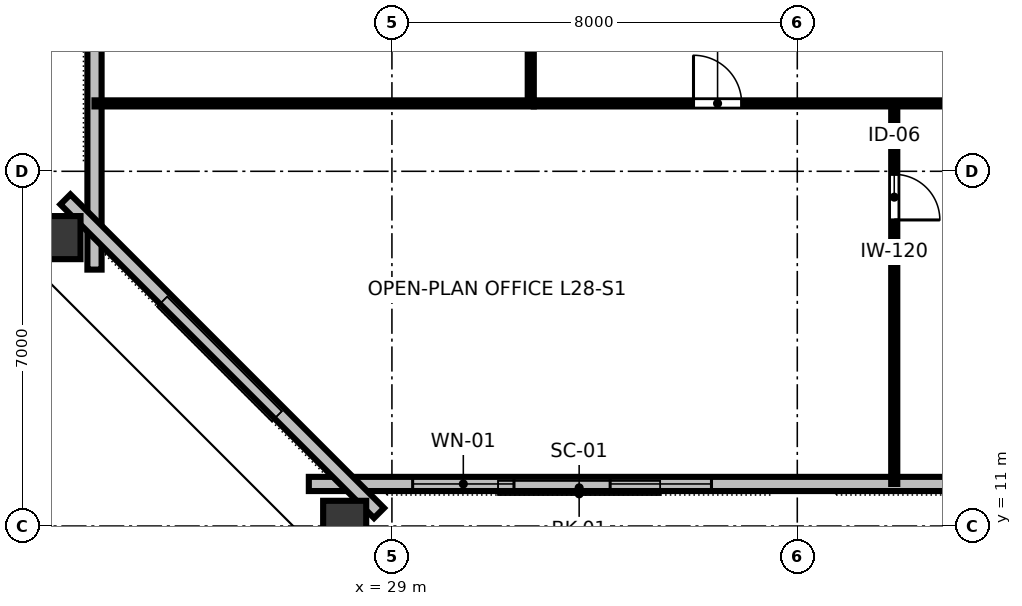
"""IFC4 building model, lengths in metres.
Left out: names, types, materials, properties, quantities, classifications, styles, units other than length and angle.
Written with IfcOpenShell. Run it as: python <this file> out.ifc"""

import sys

from ifc_helpers import new_model, si_unit, direction, frame, frame_2d, origin, origin_2d, place, context, subcontext, project, spatial, rectangle, hollow_rectangle, extrude, element, fill, save


model = new_model("IFC4")
c1 = context("Model", 3, precision=1e-05, world=origin(), true_north=direction((0.0, 1.0)))
c2 = subcontext(c1, "Body", "Model", "MODEL_VIEW")
j1 = project(units=[si_unit("LENGTHUNIT", "METRE"), si_unit("PLANEANGLEUNIT", "RADIAN")], contexts=[c1])
p1 = place(None, origin())
s1 = spatial("IfcSite", under=j1, at=p1, CompositionType="ELEMENT")
p2 = place(p1, origin())
s2 = spatial("IfcBuilding", under=s1, at=p2, CompositionType="ELEMENT")
p3 = place(p2, frame((0.0, 0.0, 109.6)))
s3 = spatial("IfcBuildingStorey", under=s2, at=p3, CompositionType="ELEMENT", Elevation=109.6)
for number, where, z_axis, x_axis in (
    (1, (28.067, 10.998, 0.0), (0.0, 0.0, 1.0), (1.0, 0.0, 0.0)),
    (2, (22.354, 16.691, 0.0), (0.0, 0.0, 1.0), (0.0, 1.0, 0.0)),
):
    element("IfcColumn", number, at=place(p3, frame(where, z_axis=z_axis, x_axis=x_axis)), inside=s3, PredefinedType="COLUMN", context=c2, shape_type="SweptSolid", body=[
        extrude(hollow_rectangle(XDim=0.85, YDim=1.0, WallThickness=0.05, at=origin_2d()), origin(), (0.0, 0.0, 1.0), 3.358),
    ])
p4 = place(p3, frame((27.36, 11.83, 0.0), z_axis=(0.0, 0.0, 1.0), x_axis=(1.0, 0.0, 0.0)))
e3 = element("IfcWall", 3, at=p4, inside=s3, PredefinedType="STANDARD", context=c2, shape_type="SweptSolid", body=[
    extrude(rectangle(XDim=37.28, YDim=0.28, at=frame_2d((18.64, 0.0))), origin(), (0.0, 0.0, 1.0), 3.36),
])
p5 = place(p4, frame((19.99, 0.0, 0.0)))
e4 = element("IfcOpeningElement", 4, at=p5, cuts=e3, PredefinedType="OPENING", context=c2, shape_type="SweptSolid", body=[
    extrude(rectangle(XDim=1.4, YDim=2.15, at=frame_2d((0.7, 1.075))), frame((0.0, 0.15, 0.0), z_axis=(0.0, -1.0, 0.0), x_axis=(1.0, 0.0, 0.0)), (0.0, 0.0, 1.0), 0.3),
])
p6 = place(p4, frame((2.049, 0.0, 0.8)))
e5 = element("IfcOpeningElement", 5, at=p6, cuts=e3, PredefinedType="OPENING", context=c2, shape_type="SweptSolid", body=[
    extrude(rectangle(XDim=2.0, YDim=1.95, at=frame_2d((1.0, 0.975))), frame((0.0, 0.15, 0.0), z_axis=(0.0, -1.0, 0.0), x_axis=(1.0, 0.0, 0.0)), (0.0, 0.0, 1.0), 0.3),
])
p7 = place(p4, frame((5.947, 0.0, 0.8)))
e6 = element("IfcOpeningElement", 6, at=p7, cuts=e3, PredefinedType="OPENING", context=c2, shape_type="SweptSolid", body=[
    extrude(rectangle(XDim=2.0, YDim=1.95, at=frame_2d((1.0, 0.975))), frame((0.0, 0.15, 0.0), z_axis=(0.0, -1.0, 0.0), x_axis=(1.0, 0.0, 0.0)), (0.0, 0.0, 1.0), 0.3),
])
p8 = place(p4, frame((13.742, 0.0, 0.8)))
e7 = element("IfcOpeningElement", 7, at=p8, cuts=e3, PredefinedType="OPENING", context=c2, shape_type="SweptSolid", body=[
    extrude(rectangle(XDim=2.0, YDim=1.95, at=frame_2d((1.0, 0.975))), frame((0.0, 0.15, 0.0), z_axis=(0.0, -1.0, 0.0), x_axis=(1.0, 0.0, 0.0)), (0.0, 0.0, 1.0), 0.3),
])
p9 = place(p4, frame((25.436, 0.0, 0.8)))
e8 = element("IfcOpeningElement", 8, at=p9, cuts=e3, PredefinedType="OPENING", context=c2, shape_type="SweptSolid", body=[
    extrude(rectangle(XDim=2.0, YDim=1.95, at=frame_2d((1.0, 0.975))), frame((0.0, 0.15, 0.0), z_axis=(0.0, -1.0, 0.0), x_axis=(1.0, 0.0, 0.0)), (0.0, 0.0, 1.0), 0.3),
])
p10 = place(p4, frame((29.333, 0.0, 0.8)))
e9 = element("IfcOpeningElement", 9, at=p10, cuts=e3, PredefinedType="OPENING", context=c2, shape_type="SweptSolid", body=[
    extrude(rectangle(XDim=2.0, YDim=1.95, at=frame_2d((1.0, 0.975))), frame((0.0, 0.15, 0.0), z_axis=(0.0, -1.0, 0.0), x_axis=(1.0, 0.0, 0.0)), (0.0, 0.0, 1.0), 0.3),
])
p11 = place(p4, frame((33.231, 0.0, 0.8)))
e10 = element("IfcOpeningElement", 10, at=p11, cuts=e3, PredefinedType="OPENING", context=c2, shape_type="SweptSolid", body=[
    extrude(rectangle(XDim=2.0, YDim=1.95, at=frame_2d((1.0, 0.975))), frame((0.0, 0.15, 0.0), z_axis=(0.0, -1.0, 0.0), x_axis=(1.0, 0.0, 0.0)), (0.0, 0.0, 1.0), 0.3),
])
p12 = place(p3, frame((23.13, 47.94, 0.0), z_axis=(0.0, 0.0, 1.0), x_axis=(0.0, -1.0, 0.0)))
e11 = element("IfcWall", 11, at=p12, inside=s3, PredefinedType="STANDARD", context=c2, shape_type="SweptSolid", body=[
    extrude(rectangle(XDim=31.88, YDim=0.28, at=frame_2d((15.94, 0.0))), origin(), (0.0, 0.0, 1.0), 3.36),
])
p13 = place(p12, frame((5.665, 0.0, 0.8)))
e12 = element("IfcOpeningElement", 12, at=p13, cuts=e11, PredefinedType="OPENING", context=c2, shape_type="SweptSolid", body=[
    extrude(rectangle(XDim=2.0, YDim=1.95, at=frame_2d((1.0, 0.975))), frame((0.0, 0.15, 0.0), z_axis=(0.0, -1.0, 0.0), x_axis=(1.0, 0.0, 0.0)), (0.0, 0.0, 1.0), 0.3),
])
p14 = place(p12, frame((9.375, 0.0, 0.8)))
e13 = element("IfcOpeningElement", 13, at=p14, cuts=e11, PredefinedType="OPENING", context=c2, shape_type="SweptSolid", body=[
    extrude(rectangle(XDim=2.0, YDim=1.95, at=frame_2d((1.0, 0.975))), frame((0.0, 0.15, 0.0), z_axis=(0.0, -1.0, 0.0), x_axis=(1.0, 0.0, 0.0)), (0.0, 0.0, 1.0), 0.3),
])
p15 = place(p12, frame((20.505, 0.0, 0.8)))
e14 = element("IfcOpeningElement", 14, at=p15, cuts=e11, PredefinedType="OPENING", context=c2, shape_type="SweptSolid", body=[
    extrude(rectangle(XDim=2.0, YDim=1.95, at=frame_2d((1.0, 0.975))), frame((0.0, 0.15, 0.0), z_axis=(0.0, -1.0, 0.0), x_axis=(1.0, 0.0, 0.0)), (0.0, 0.0, 1.0), 0.3),
])
p16 = place(p12, frame((24.215, 0.0, 0.8)))
e15 = element("IfcOpeningElement", 15, at=p16, cuts=e11, PredefinedType="OPENING", context=c2, shape_type="SweptSolid", body=[
    extrude(rectangle(XDim=2.0, YDim=1.95, at=frame_2d((1.0, 0.975))), frame((0.0, 0.15, 0.0), z_axis=(0.0, -1.0, 0.0), x_axis=(1.0, 0.0, 0.0)), (0.0, 0.0, 1.0), 0.3),
])
p17 = place(p3, frame((22.556, 17.446, 0.0), z_axis=(0.0, 0.0, 1.0), x_axis=(0.707106781187, -0.707106781187, 0.0)))
e16 = element("IfcWall", 16, at=p17, inside=s3, PredefinedType="STANDARD", context=c2, shape_type="SweptSolid", body=[
    extrude(rectangle(XDim=8.753, YDim=0.28, at=frame_2d((4.376, 0.0))), origin(), (0.0, 0.0, 1.0), 3.36),
])
p18 = place(p3, frame((38.914, 19.34, 0.0), z_axis=(0.0, 0.0, 1.0), x_axis=(0.0, -1.0, 0.0)))
e17 = element("IfcWall", 17, at=p18, inside=s3, PredefinedType="PARTITIONING", context=c2, shape_type="SweptSolid", body=[
    extrude(rectangle(XDim=7.51, YDim=0.12, at=frame_2d((3.755, 0.0))), origin(), (0.0, 0.0, 1.0), 2.64),
])
p19 = place(p18, frame((1.4, 0.0, 0.0)))
e18 = element("IfcOpeningElement", 18, at=p19, cuts=e17, PredefinedType="OPENING", context=c2, shape_type="SweptSolid", body=[
    extrude(rectangle(XDim=0.9, YDim=2.15, at=frame_2d((0.45, 1.075))), frame((0.0, 0.07, 0.0), z_axis=(0.0, -1.0, 0.0), x_axis=(1.0, 0.0, 0.0)), (0.0, 0.0, 1.0), 0.14),
])
p20 = place(p3, frame((31.8, 19.34, 0.0), z_axis=(0.0, 0.0, 1.0), x_axis=(1.0, 0.0, 0.0)))
e19 = element("IfcWall", 19, at=p20, inside=s3, PredefinedType="PARTITIONING", context=c2, shape_type="SweptSolid", body=[
    extrude(rectangle(XDim=28.4, YDim=0.12, at=frame_2d((14.2, 0.0))), origin(), (0.0, 0.0, 1.0), 2.64),
])
p21 = place(p20, frame((3.152, 0.0, 0.0)))
e20 = element("IfcOpeningElement", 20, at=p21, cuts=e19, PredefinedType="OPENING", context=c2, shape_type="SweptSolid", body=[
    extrude(rectangle(XDim=0.95, YDim=2.15, at=frame_2d((0.475, 1.075))), frame((0.0, 0.07, 0.0), z_axis=(0.0, -1.0, 0.0), x_axis=(1.0, 0.0, 0.0)), (0.0, 0.0, 1.0), 0.14),
])
p22 = place(p20, frame((10.136, 0.0, 0.0)))
e21 = element("IfcOpeningElement", 21, at=p22, cuts=e19, PredefinedType="OPENING", context=c2, shape_type="SweptSolid", body=[
    extrude(rectangle(XDim=0.95, YDim=2.15, at=frame_2d((0.475, 1.075))), frame((0.0, 0.07, 0.0), z_axis=(0.0, -1.0, 0.0), x_axis=(1.0, 0.0, 0.0)), (0.0, 0.0, 1.0), 0.14),
])
p23 = place(p20, frame((15.813, 0.0, 0.0)))
e22 = element("IfcOpeningElement", 22, at=p23, cuts=e19, PredefinedType="OPENING", context=c2, shape_type="SweptSolid", body=[
    extrude(rectangle(XDim=0.95, YDim=2.15, at=frame_2d((0.475, 1.075))), frame((0.0, 0.07, 0.0), z_axis=(0.0, -1.0, 0.0), x_axis=(1.0, 0.0, 0.0)), (0.0, 0.0, 1.0), 0.14),
])
p24 = place(p20, frame((22.888, 0.0, 0.0)))
e23 = element("IfcOpeningElement", 23, at=p24, cuts=e19, PredefinedType="OPENING", context=c2, shape_type="SweptSolid", body=[
    extrude(rectangle(XDim=0.95, YDim=2.15, at=frame_2d((0.475, 1.075))), frame((0.0, 0.07, 0.0), z_axis=(0.0, -1.0, 0.0), x_axis=(1.0, 0.0, 0.0)), (0.0, 0.0, 1.0), 0.14),
])
p25 = place(p3, frame((31.74, 19.4, 0.0), z_axis=(0.0, 0.0, 1.0), x_axis=(0.0, 1.0, 0.0)))
e24 = element("IfcWall", 24, at=p25, inside=s3, PredefinedType="PARTITIONING", context=c2, shape_type="SweptSolid", body=[
    extrude(rectangle(XDim=11.58, YDim=0.12, at=frame_2d((5.79, 0.0))), origin(), (0.0, 0.0, 1.0), 2.64),
])
p26 = place(p25, frame((5.415, 0.0, 0.0)))
e25 = element("IfcOpeningElement", 25, at=p26, cuts=e24, PredefinedType="OPENING", context=c2, shape_type="SweptSolid", body=[
    extrude(rectangle(XDim=0.95, YDim=2.15, at=frame_2d((0.475, 1.075))), frame((0.0, 0.07, 0.0), z_axis=(0.0, -1.0, 0.0), x_axis=(1.0, 0.0, 0.0)), (0.0, 0.0, 1.0), 0.14),
])
p27 = place(p3, frame((31.8, 19.34, 0.0), z_axis=(0.0, 0.0, 1.0), x_axis=(-1.0, 0.0, 0.0)))
e26 = element("IfcWall", 26, at=p27, inside=s3, PredefinedType="PARTITIONING", context=c2, shape_type="SweptSolid", body=[
    extrude(rectangle(XDim=8.67, YDim=0.12, at=frame_2d((4.335, 0.0))), origin(), (0.0, 0.0, 1.0), 2.64),
])
p28 = place(p6, origin())
e27 = element("IfcWindow", 27, at=p28, inside=s3, PartitioningType="SINGLE_PANEL", PredefinedType="WINDOW", context=c2, shape_type="SweptSolid", body=[
    extrude(rectangle(XDim=2.0, YDim=1.95, at=frame_2d((1.0, 0.975))), frame((0.0, 0.03, 0.0), z_axis=(0.0, -1.0, 0.0), x_axis=(1.0, 0.0, 0.0)), (0.0, 0.0, 1.0), 0.06),
])
fill(e5, e27)
p29 = place(p7, origin())
e28 = element("IfcWindow", 28, at=p29, inside=s3, PartitioningType="SINGLE_PANEL", PredefinedType="WINDOW", context=c2, shape_type="SweptSolid", body=[
    extrude(rectangle(XDim=2.0, YDim=1.95, at=frame_2d((1.0, 0.975))), frame((0.0, 0.03, 0.0), z_axis=(0.0, -1.0, 0.0), x_axis=(1.0, 0.0, 0.0)), (0.0, 0.0, 1.0), 0.06),
])
fill(e6, e28)
p30 = place(p19, origin())
e29 = element("IfcDoor", 29, at=p30, inside=s3, OperationType="SINGLE_SWING_RIGHT", PredefinedType="DOOR", context=c2, shape_type="SweptSolid", body=[
    extrude(rectangle(XDim=0.9, YDim=2.15, at=frame_2d((0.45, 1.075))), frame((0.0, 0.025, 0.0), z_axis=(0.0, -1.0, 0.0), x_axis=(1.0, 0.0, 0.0)), (0.0, 0.0, 1.0), 0.05),
])
fill(e18, e29)
p31 = place(p21, origin())
e30 = element("IfcDoor", 30, at=p31, inside=s3, OperationType="SINGLE_SWING_LEFT", PredefinedType="DOOR", context=c2, shape_type="SweptSolid", body=[
    extrude(rectangle(XDim=0.95, YDim=2.15, at=frame_2d((0.475, 1.075))), frame((0.0, 0.025, 0.0), z_axis=(0.0, -1.0, 0.0), x_axis=(1.0, 0.0, 0.0)), (0.0, 0.0, 1.0), 0.05),
])
fill(e20, e30)
save(model, sys.argv[1])
